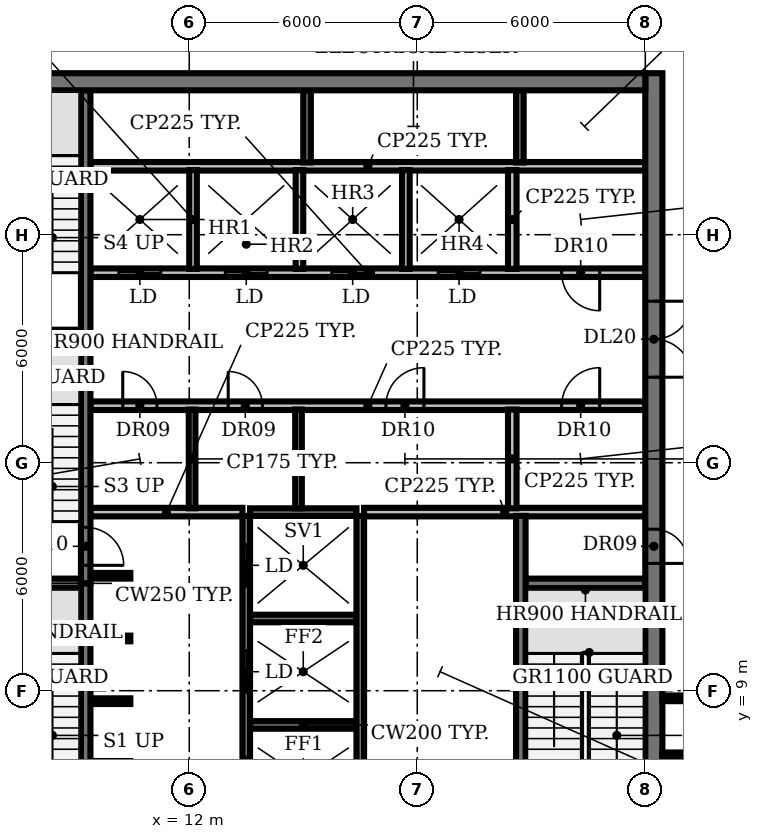
"""IFC4 building model, lengths in metres.
Left out: names, types, materials, properties, quantities, classifications, styles, units other than length and angle.
Written with IfcOpenShell. Run it as: python <this file> out.ifc"""

import sys

from ifc_helpers import new_model, si_unit, direction, frame, frame_2d, origin, place, context, subcontext, project, spatial, rectangle, extrude, element, fill, save


model = new_model("IFC4")
c1 = context("Model", 3, precision=1e-05, world=origin(), true_north=direction((0.0, 1.0)))
c2 = subcontext(c1, "Body", "Model", "MODEL_VIEW")
j1 = project(units=[si_unit("LENGTHUNIT", "METRE"), si_unit("PLANEANGLEUNIT", "RADIAN")], contexts=[c1])
p1 = place(None, origin())
s1 = spatial("IfcSite", under=j1, at=p1, CompositionType="ELEMENT")
p2 = place(p1, origin())
s2 = spatial("IfcBuilding", under=s1, at=p2, CompositionType="ELEMENT")
p3 = place(p2, frame((0.0, 0.0, 230.6)))
s3 = spatial("IfcBuildingStorey", under=s2, at=p3, CompositionType="ELEMENT", Elevation=230.6)
p4 = place(p3, frame((13.6, 8.1, 0.0), z_axis=(0.0, 0.0, 1.0), x_axis=(1.0, 0.0, 0.0)))
e1 = element("IfcWall", 1, at=p4, inside=s3, PredefinedType="SHEAR", context=c2, shape_type="SweptSolid", body=[
    extrude(rectangle(XDim=2.8, YDim=0.2, at=frame_2d((1.4, 0.0))), origin(), (0.0, 0.0, 1.0), 3.85),
])
for number, where, z_axis, x_axis in (
    (2, (9.4, 8.725, 0.0), (0.0, 0.0, 1.0), (1.0, 0.0, 0.0)),
    (3, (9.4, 10.375, 0.0), (0.0, 0.0, 1.0), (1.0, 0.0, 0.0)),
):
    element("IfcWall", number, at=place(p3, frame(where, z_axis=z_axis, x_axis=x_axis)), inside=s3, PredefinedType="SHEAR", context=c2, shape_type="SweptSolid", body=[
        extrude(rectangle(XDim=1.05, YDim=0.15, at=frame_2d((0.525, 0.0))), origin(), (0.0, 0.0, 1.0), 3.85),
    ])
p5 = place(p3, frame((13.6, 10.9, 0.0), z_axis=(0.0, 0.0, 1.0), x_axis=(1.0, 0.0, 0.0)))
e4 = element("IfcWall", 4, at=p5, inside=s3, PredefinedType="SHEAR", context=c2, shape_type="SweptSolid", body=[
    extrude(rectangle(XDim=2.8, YDim=0.2, at=frame_2d((1.4, 0.0))), origin(), (0.0, 0.0, 1.0), 3.85),
])
for number, where, z_axis, x_axis in (
    (5, (6.0, 11.825, 0.0), (0.0, 0.0, 1.0), (1.0, 0.0, 0.0)),
    (6, (20.85, 11.825, 0.0), (0.0, 0.0, 1.0), (1.0, 0.0, 0.0)),
):
    element("IfcWall", number, at=place(p3, frame(where, z_axis=z_axis, x_axis=x_axis)), inside=s3, PredefinedType="SHEAR", context=c2, shape_type="SweptSolid", body=[
        extrude(rectangle(XDim=3.15, YDim=0.25, at=frame_2d((1.575, 0.0))), origin(), (0.0, 0.0, 1.0), 3.85),
    ])
p6 = place(p3, frame((9.4, 12.025, 0.0), z_axis=(0.0, 0.0, 1.0), x_axis=(1.0, 0.0, 0.0)))
e7 = element("IfcWall", 7, at=p6, inside=s3, PredefinedType="SHEAR", context=c2, shape_type="SweptSolid", body=[
    extrude(rectangle(XDim=1.05, YDim=0.15, at=frame_2d((0.525, 0.0))), origin(), (0.0, 0.0, 1.0), 3.85),
])
p7 = place(p3, frame((9.4, 13.7, 0.0), z_axis=(0.0, 0.0, 1.0), x_axis=(1.0, 0.0, 0.0)))
e8 = element("IfcWall", 8, at=p7, inside=s3, PredefinedType="PARTITIONING", context=c2, shape_type="SweptSolid", body=[
    extrude(rectangle(XDim=4.0, YDim=0.225, at=frame_2d((2.0, 0.0))), origin(), (0.0, 0.0, 1.0), 3.85),
])
p8 = place(p3, frame((13.6, 13.7, 0.0), z_axis=(0.0, 0.0, 1.0), x_axis=(1.0, 0.0, 0.0)))
e9 = element("IfcWall", 9, at=p8, inside=s3, PredefinedType="SHEAR", context=c2, shape_type="SweptSolid", body=[
    extrude(rectangle(XDim=2.8, YDim=0.2, at=frame_2d((1.4, 0.0))), origin(), (0.0, 0.0, 1.0), 3.85),
])
p9 = place(p3, frame((16.6, 13.7, 0.0), z_axis=(0.0, 0.0, 1.0), x_axis=(1.0, 0.0, 0.0)))
e10 = element("IfcWall", 10, at=p9, inside=s3, PredefinedType="PARTITIONING", context=c2, shape_type="SweptSolid", body=[
    extrude(rectangle(XDim=7.4, YDim=0.225, at=frame_2d((3.7, 0.0))), origin(), (0.0, 0.0, 1.0), 3.85),
])
p10 = place(p3, frame((9.4, 16.5, 0.0), z_axis=(0.0, 0.0, 1.0), x_axis=(1.0, 0.0, 0.0)))
e11 = element("IfcWall", 11, at=p10, inside=s3, PredefinedType="PARTITIONING", context=c2, shape_type="SweptSolid", body=[
    extrude(rectangle(XDim=14.6, YDim=0.225, at=frame_2d((7.3, 0.0))), origin(), (0.0, 0.0, 1.0), 3.85),
])
p11 = place(p10, frame((0.85, 0.0, 0.0)))
e12 = element("IfcOpeningElement", 12, at=p11, cuts=e11, PredefinedType="OPENING", context=c2, shape_type="SweptSolid", body=[
    extrude(rectangle(XDim=0.9, YDim=2.1, at=frame_2d((0.45, 1.05))), frame((0.0, 0.123, 0.0), z_axis=(0.0, -1.0, 0.0), x_axis=(1.0, 0.0, 0.0)), (0.0, 0.0, 1.0), 0.245),
])
p12 = place(p10, frame((3.625, 0.0, 0.0)))
e13 = element("IfcOpeningElement", 13, at=p12, cuts=e11, PredefinedType="OPENING", context=c2, shape_type="SweptSolid", body=[
    extrude(rectangle(XDim=0.9, YDim=2.1, at=frame_2d((0.45, 1.05))), frame((0.0, 0.123, 0.0), z_axis=(0.0, -1.0, 0.0), x_axis=(1.0, 0.0, 0.0)), (0.0, 0.0, 1.0), 0.245),
])
p13 = place(p10, frame((7.775, 0.0, 0.0)))
e14 = element("IfcOpeningElement", 14, at=p13, cuts=e11, PredefinedType="OPENING", context=c2, shape_type="SweptSolid", body=[
    extrude(rectangle(XDim=1.0, YDim=2.1, at=frame_2d((0.5, 1.05))), frame((0.0, 0.123, 0.0), z_axis=(0.0, -1.0, 0.0), x_axis=(1.0, 0.0, 0.0)), (0.0, 0.0, 1.0), 0.245),
])
p14 = place(p10, frame((12.4, 0.0, 0.0)))
e15 = element("IfcOpeningElement", 15, at=p14, cuts=e11, PredefinedType="OPENING", context=c2, shape_type="SweptSolid", body=[
    extrude(rectangle(XDim=1.0, YDim=2.1, at=frame_2d((0.5, 1.05))), frame((0.0, 0.123, 0.0), z_axis=(0.0, -1.0, 0.0), x_axis=(1.0, 0.0, 0.0)), (0.0, 0.0, 1.0), 0.245),
])
p15 = place(p3, frame((6.0, 18.375, 0.0), z_axis=(0.0, 0.0, 1.0), x_axis=(1.0, 0.0, 0.0)))
e16 = element("IfcWall", 16, at=p15, inside=s3, PredefinedType="SHEAR", context=c2, shape_type="SweptSolid", body=[
    extrude(rectangle(XDim=3.15, YDim=0.25, at=frame_2d((1.575, 0.0))), origin(), (0.0, 0.0, 1.0), 3.85),
])
p16 = place(p3, frame((24.0, 20.0, 0.0), z_axis=(0.0, 0.0, 1.0), x_axis=(-1.0, 0.0, 0.0)))
e17 = element("IfcWall", 17, at=p16, inside=s3, PredefinedType="PARTITIONING", context=c2, shape_type="SweptSolid", body=[
    extrude(rectangle(XDim=14.6, YDim=0.225, at=frame_2d((7.3, 0.0))), origin(), (0.0, 0.0, 1.0), 3.85),
])
p17 = place(p16, frame((12.75, 0.0, 0.0)))
e18 = element("IfcOpeningElement", 18, at=p17, cuts=e17, PredefinedType="OPENING", context=c2, shape_type="SweptSolid", body=[
    extrude(rectangle(XDim=1.1, YDim=2.1, at=frame_2d((0.55, 1.05))), frame((0.0, 0.123, 0.0), z_axis=(0.0, -1.0, 0.0), x_axis=(1.0, 0.0, 0.0)), (0.0, 0.0, 1.0), 0.245),
])
p18 = place(p16, frame((9.95, 0.0, 0.0)))
e19 = element("IfcOpeningElement", 19, at=p18, cuts=e17, PredefinedType="OPENING", context=c2, shape_type="SweptSolid", body=[
    extrude(rectangle(XDim=1.1, YDim=2.1, at=frame_2d((0.55, 1.05))), frame((0.0, 0.123, 0.0), z_axis=(0.0, -1.0, 0.0), x_axis=(1.0, 0.0, 0.0)), (0.0, 0.0, 1.0), 0.245),
])
p19 = place(p16, frame((7.15, 0.0, 0.0)))
e20 = element("IfcOpeningElement", 20, at=p19, cuts=e17, PredefinedType="OPENING", context=c2, shape_type="SweptSolid", body=[
    extrude(rectangle(XDim=1.1, YDim=2.1, at=frame_2d((0.55, 1.05))), frame((0.0, 0.123, 0.0), z_axis=(0.0, -1.0, 0.0), x_axis=(1.0, 0.0, 0.0)), (0.0, 0.0, 1.0), 0.245),
])
p20 = place(p16, frame((4.35, 0.0, 0.0)))
e21 = element("IfcOpeningElement", 21, at=p20, cuts=e17, PredefinedType="OPENING", context=c2, shape_type="SweptSolid", body=[
    extrude(rectangle(XDim=1.1, YDim=2.1, at=frame_2d((0.55, 1.05))), frame((0.0, 0.123, 0.0), z_axis=(0.0, -1.0, 0.0), x_axis=(1.0, 0.0, 0.0)), (0.0, 0.0, 1.0), 0.245),
])
p21 = place(p16, frame((1.2, 0.0, 0.0)))
e22 = element("IfcOpeningElement", 22, at=p21, cuts=e17, PredefinedType="OPENING", context=c2, shape_type="SweptSolid", body=[
    extrude(rectangle(XDim=1.0, YDim=2.1, at=frame_2d((0.5, 1.05))), frame((0.0, 0.123, 0.0), z_axis=(0.0, -1.0, 0.0), x_axis=(1.0, 0.0, 0.0)), (0.0, 0.0, 1.0), 0.245),
])
p22 = place(p3, frame((9.4, 22.8, 0.0), z_axis=(0.0, 0.0, 1.0), x_axis=(1.0, 0.0, 0.0)))
e23 = element("IfcWall", 23, at=p22, inside=s3, PredefinedType="PARTITIONING", context=c2, shape_type="SweptSolid", body=[
    extrude(rectangle(XDim=14.6, YDim=0.225, at=frame_2d((7.3, 0.0))), origin(), (0.0, 0.0, 1.0), 3.85),
])
p23 = place(p3, frame((9.275, 11.825, 0.0), z_axis=(0.0, 0.0, 1.0), x_axis=(0.0, -1.0, 0.0)))
e24 = element("IfcWall", 24, at=p23, inside=s3, PredefinedType="SHEAR", context=c2, shape_type="SweptSolid", body=[
    extrude(rectangle(XDim=6.425, YDim=0.25, at=frame_2d((3.212, 0.0))), origin(), (0.0, 0.0, 1.0), 3.85),
])
p24 = place(p23, frame((5.075, 0.0, 0.0)))
e25 = element("IfcOpeningElement", 25, at=p24, cuts=e24, PredefinedType="OPENING", context=c2, shape_type="SweptSolid", body=[
    extrude(rectangle(XDim=1.0, YDim=2.1, at=frame_2d((0.5, 1.05))), frame((0.0, 0.135, 0.0), z_axis=(0.0, -1.0, 0.0), x_axis=(1.0, 0.0, 0.0)), (0.0, 0.0, 1.0), 0.27),
])
p25 = place(p3, frame((9.275, 18.375, 0.0), z_axis=(0.0, 0.0, 1.0), x_axis=(0.0, -1.0, 0.0)))
e26 = element("IfcWall", 26, at=p25, inside=s3, PredefinedType="SHEAR", context=c2, shape_type="SweptSolid", body=[
    extrude(rectangle(XDim=6.55, YDim=0.25, at=frame_2d((3.275, 0.0))), origin(), (0.0, 0.0, 1.0), 3.85),
])
p26 = place(p25, frame((5.075, 0.0, 0.0)))
e27 = element("IfcOpeningElement", 27, at=p26, cuts=e26, PredefinedType="OPENING", context=c2, shape_type="SweptSolid", body=[
    extrude(rectangle(XDim=1.0, YDim=2.1, at=frame_2d((0.5, 1.05))), frame((0.0, 0.135, 0.0), z_axis=(0.0, -1.0, 0.0), x_axis=(1.0, 0.0, 0.0)), (0.0, 0.0, 1.0), 0.27),
])
p27 = place(p3, frame((9.275, 18.375, 0.0), z_axis=(0.0, 0.0, 1.0), x_axis=(0.0, 1.0, 0.0)))
e28 = element("IfcWall", 28, at=p27, inside=s3, PredefinedType="SHEAR", context=c2, shape_type="SweptSolid", body=[
    extrude(rectangle(XDim=6.425, YDim=0.25, at=frame_2d((3.212, 0.0))), origin(), (0.0, 0.0, 1.0), 3.85),
])
p28 = place(p3, frame((12.075, 13.8, 0.0), z_axis=(0.0, 0.0, 1.0), x_axis=(0.0, 1.0, 0.0)))
e29 = element("IfcWall", 29, at=p28, inside=s3, PredefinedType="PARTITIONING", context=c2, shape_type="SweptSolid", body=[
    extrude(rectangle(XDim=2.6, YDim=0.175, at=frame_2d((1.3, 0.0))), origin(), (0.0, 0.0, 1.0), 3.85),
])
p29 = place(p3, frame((12.1, 20.1, 0.0), z_axis=(0.0, 0.0, 1.0), x_axis=(0.0, 1.0, 0.0)))
e30 = element("IfcWall", 30, at=p29, inside=s3, PredefinedType="SOLIDWALL", context=c2, shape_type="SweptSolid", body=[
    extrude(rectangle(XDim=2.6, YDim=0.2, at=frame_2d((1.3, 0.0))), origin(), (0.0, 0.0, 1.0), 3.85),
])
p30 = place(p3, frame((13.5, 5.4, 0.0), z_axis=(0.0, 0.0, 1.0), x_axis=(0.0, 1.0, 0.0)))
e31 = element("IfcWall", 31, at=p30, inside=s3, PredefinedType="SHEAR", context=c2, shape_type="SweptSolid", body=[
    extrude(rectangle(XDim=8.2, YDim=0.2, at=frame_2d((4.1, 0.0))), origin(), (0.0, 0.0, 1.0), 3.85),
])
p31 = place(p30, frame((0.75, 0.0, 0.0)))
e32 = element("IfcOpeningElement", 32, at=p31, cuts=e31, PredefinedType="OPENING", context=c2, shape_type="SweptSolid", body=[
    extrude(rectangle(XDim=1.1, YDim=2.1, at=frame_2d((0.55, 1.05))), frame((0.0, 0.11, 0.0), z_axis=(0.0, -1.0, 0.0), x_axis=(1.0, 0.0, 0.0)), (0.0, 0.0, 1.0), 0.22),
])
p32 = place(p30, frame((3.55, 0.0, 0.0)))
e33 = element("IfcOpeningElement", 33, at=p32, cuts=e31, PredefinedType="OPENING", context=c2, shape_type="SweptSolid", body=[
    extrude(rectangle(XDim=1.1, YDim=2.1, at=frame_2d((0.55, 1.05))), frame((0.0, 0.11, 0.0), z_axis=(0.0, -1.0, 0.0), x_axis=(1.0, 0.0, 0.0)), (0.0, 0.0, 1.0), 0.22),
])
p33 = place(p30, frame((6.35, 0.0, 0.0)))
e34 = element("IfcOpeningElement", 34, at=p33, cuts=e31, PredefinedType="OPENING", context=c2, shape_type="SweptSolid", body=[
    extrude(rectangle(XDim=1.1, YDim=2.1, at=frame_2d((0.55, 1.05))), frame((0.0, 0.11, 0.0), z_axis=(0.0, -1.0, 0.0), x_axis=(1.0, 0.0, 0.0)), (0.0, 0.0, 1.0), 0.22),
])
p34 = place(p3, frame((14.875, 13.8, 0.0), z_axis=(0.0, 0.0, 1.0), x_axis=(0.0, 1.0, 0.0)))
e35 = element("IfcWall", 35, at=p34, inside=s3, PredefinedType="PARTITIONING", context=c2, shape_type="SweptSolid", body=[
    extrude(rectangle(XDim=2.6, YDim=0.175, at=frame_2d((1.3, 0.0))), origin(), (0.0, 0.0, 1.0), 3.85),
])
p35 = place(p3, frame((14.9, 20.1, 0.0), z_axis=(0.0, 0.0, 1.0), x_axis=(0.0, 1.0, 0.0)))
e36 = element("IfcWall", 36, at=p35, inside=s3, PredefinedType="SOLIDWALL", context=c2, shape_type="SweptSolid", body=[
    extrude(rectangle(XDim=2.6, YDim=0.2, at=frame_2d((1.3, 0.0))), origin(), (0.0, 0.0, 1.0), 3.85),
])
p36 = place(p3, frame((15.1, 22.9, 0.0), z_axis=(0.0, 0.0, 1.0), x_axis=(0.0, 1.0, 0.0)))
e37 = element("IfcWall", 37, at=p36, inside=s3, PredefinedType="SHEAR", context=c2, shape_type="SweptSolid", body=[
    extrude(rectangle(XDim=1.9, YDim=0.2, at=frame_2d((0.95, 0.0))), origin(), (0.0, 0.0, 1.0), 3.85),
])
p37 = place(p3, frame((16.5, 5.4, 0.0), z_axis=(0.0, 0.0, 1.0), x_axis=(0.0, 1.0, 0.0)))
e38 = element("IfcWall", 38, at=p37, inside=s3, PredefinedType="SHEAR", context=c2, shape_type="SweptSolid", body=[
    extrude(rectangle(XDim=8.2, YDim=0.2, at=frame_2d((4.1, 0.0))), origin(), (0.0, 0.0, 1.0), 3.85),
])
p38 = place(p3, frame((17.7, 20.1, 0.0), z_axis=(0.0, 0.0, 1.0), x_axis=(0.0, 1.0, 0.0)))
e39 = element("IfcWall", 39, at=p38, inside=s3, PredefinedType="SOLIDWALL", context=c2, shape_type="SweptSolid", body=[
    extrude(rectangle(XDim=2.6, YDim=0.2, at=frame_2d((1.3, 0.0))), origin(), (0.0, 0.0, 1.0), 3.85),
])
for number, where, z_axis, x_axis in (
    (40, (20.5, 13.8, 0.0), (0.0, 0.0, 1.0), (0.0, 1.0, 0.0)),
    (41, (20.5, 20.1, 0.0), (0.0, 0.0, 1.0), (0.0, 1.0, 0.0)),
):
    element("IfcWall", number, at=place(p3, frame(where, z_axis=z_axis, x_axis=x_axis)), inside=s3, PredefinedType="PARTITIONING", context=c2, shape_type="SweptSolid", body=[
        extrude(rectangle(XDim=2.6, YDim=0.225, at=frame_2d((1.3, 0.0))), origin(), (0.0, 0.0, 1.0), 3.85),
    ])
p39 = place(p3, frame((20.7, 22.9, 0.0), z_axis=(0.0, 0.0, 1.0), x_axis=(0.0, 1.0, 0.0)))
e42 = element("IfcWall", 42, at=p39, inside=s3, PredefinedType="SHEAR", context=c2, shape_type="SweptSolid", body=[
    extrude(rectangle(XDim=1.9, YDim=0.2, at=frame_2d((0.95, 0.0))), origin(), (0.0, 0.0, 1.0), 3.85),
])
p40 = place(p3, frame((20.725, 5.4, 0.0), z_axis=(0.0, 0.0, 1.0), x_axis=(0.0, 1.0, 0.0)))
e43 = element("IfcWall", 43, at=p40, inside=s3, PredefinedType="SHEAR", context=c2, shape_type="SweptSolid", body=[
    extrude(rectangle(XDim=8.2, YDim=0.25, at=frame_2d((4.1, 0.0))), origin(), (0.0, 0.0, 1.0), 3.85),
])
p41 = place(p3, frame((24.225, 25.25, 0.0), z_axis=(0.0, 0.0, 1.0), x_axis=(0.0, -1.0, 0.0)))
e44 = element("IfcWall", 44, at=p41, inside=s3, PredefinedType="SHEAR", context=c2, shape_type="SweptSolid", body=[
    extrude(rectangle(XDim=20.83, YDim=0.45, at=frame_2d((10.415, 0.0))), origin(), (0.0, 0.0, 1.0), 3.85),
])
p42 = place(p41, frame((18.1, 0.0, 0.0)))
e45 = element("IfcOpeningElement", 45, at=p42, cuts=e44, PredefinedType="OPENING", context=c2, shape_type="SweptSolid", body=[
    extrude(rectangle(XDim=1.5, YDim=2.1, at=frame_2d((0.75, 1.05))), frame((0.0, 0.235, 0.0), z_axis=(0.0, -1.0, 0.0), x_axis=(1.0, 0.0, 0.0)), (0.0, 0.0, 1.0), 0.47),
])
p43 = place(p41, frame((12.0, 0.0, 0.0)))
e46 = element("IfcOpeningElement", 46, at=p43, cuts=e44, PredefinedType="OPENING", context=c2, shape_type="SweptSolid", body=[
    extrude(rectangle(XDim=0.9, YDim=2.1, at=frame_2d((0.45, 1.05))), frame((0.0, 0.235, 0.0), z_axis=(0.0, -1.0, 0.0), x_axis=(1.0, 0.0, 0.0)), (0.0, 0.0, 1.0), 0.47),
])
p44 = place(p41, frame((6.0, 0.0, 0.0)))
e47 = element("IfcOpeningElement", 47, at=p44, cuts=e44, PredefinedType="OPENING", context=c2, shape_type="SweptSolid", body=[
    extrude(rectangle(XDim=2.0, YDim=2.1, at=frame_2d((1.0, 1.05))), frame((0.0, 0.235, 0.0), z_axis=(0.0, -1.0, 0.0), x_axis=(1.0, 0.0, 0.0)), (0.0, 0.0, 1.0), 0.47),
])
p45 = place(p3, frame((6.0, 25.025, 0.0), z_axis=(0.0, 0.0, 1.0), x_axis=(1.0, 0.0, 0.0)))
e48 = element("IfcWall", 48, at=p45, inside=s3, PredefinedType="SHEAR", context=c2, shape_type="SweptSolid", body=[
    extrude(rectangle(XDim=18.0, YDim=0.45, at=frame_2d((9.0, 0.0))), origin(), (0.0, 0.0, 1.0), 3.85),
])
for number, where, z_axis, x_axis in (
    (49, (24.45, 7.3, 0.0), (0.0, 0.0, 1.0), (1.0, 0.0, 0.0)),
    (50, (24.45, 8.8, 0.0), (0.0, 0.0, 1.0), (1.0, 0.0, 0.0)),
):
    element("IfcWall", number, at=place(p3, frame(where, z_axis=z_axis, x_axis=x_axis)), inside=s3, PredefinedType="PARTITIONING", context=c2, shape_type="SweptSolid", body=[
        extrude(rectangle(XDim=1.05, YDim=0.15, at=frame_2d((0.525, 0.0))), origin(), (0.0, 0.0, 1.0), 2.88),
    ])
p46 = place(p11, origin())
e51 = element("IfcDoor", 51, at=p46, inside=s3, OperationType="SINGLE_SWING_LEFT", PredefinedType="DOOR", context=c2, shape_type="SweptSolid", body=[
    extrude(rectangle(XDim=0.9, YDim=2.1, at=frame_2d((0.45, 1.05))), frame((0.0, 0.025, 0.0), z_axis=(0.0, -1.0, 0.0), x_axis=(1.0, 0.0, 0.0)), (0.0, 0.0, 1.0), 0.05),
])
fill(e12, e51)
p47 = place(p12, origin())
e52 = element("IfcDoor", 52, at=p47, inside=s3, OperationType="SINGLE_SWING_LEFT", PredefinedType="DOOR", context=c2, shape_type="SweptSolid", body=[
    extrude(rectangle(XDim=0.9, YDim=2.1, at=frame_2d((0.45, 1.05))), frame((0.0, 0.025, 0.0), z_axis=(0.0, -1.0, 0.0), x_axis=(1.0, 0.0, 0.0)), (0.0, 0.0, 1.0), 0.05),
])
fill(e13, e52)
p48 = place(p13, origin())
e53 = element("IfcDoor", 53, at=p48, inside=s3, OperationType="SINGLE_SWING_RIGHT", PredefinedType="DOOR", context=c2, shape_type="SweptSolid", body=[
    extrude(rectangle(XDim=1.0, YDim=2.1, at=frame_2d((0.5, 1.05))), frame((0.0, 0.025, 0.0), z_axis=(0.0, -1.0, 0.0), x_axis=(1.0, 0.0, 0.0)), (0.0, 0.0, 1.0), 0.05),
])
fill(e14, e53)
p49 = place(p14, origin())
e54 = element("IfcDoor", 54, at=p49, inside=s3, OperationType="SINGLE_SWING_RIGHT", PredefinedType="DOOR", context=c2, shape_type="SweptSolid", body=[
    extrude(rectangle(XDim=1.0, YDim=2.1, at=frame_2d((0.5, 1.05))), frame((0.0, 0.025, 0.0), z_axis=(0.0, -1.0, 0.0), x_axis=(1.0, 0.0, 0.0)), (0.0, 0.0, 1.0), 0.05),
])
fill(e15, e54)
p50 = place(p17, origin())
e55 = element("IfcDoor", 55, at=p50, inside=s3, OperationType="DOUBLE_DOOR_SLIDING", PredefinedType="DOOR", context=c2, shape_type="SweptSolid", body=[
    extrude(rectangle(XDim=1.1, YDim=2.1, at=frame_2d((0.55, 1.05))), frame((0.0, 0.025, 0.0), z_axis=(0.0, -1.0, 0.0), x_axis=(1.0, 0.0, 0.0)), (0.0, 0.0, 1.0), 0.05),
])
fill(e18, e55)
p51 = place(p18, origin())
e56 = element("IfcDoor", 56, at=p51, inside=s3, OperationType="DOUBLE_DOOR_SLIDING", PredefinedType="DOOR", context=c2, shape_type="SweptSolid", body=[
    extrude(rectangle(XDim=1.1, YDim=2.1, at=frame_2d((0.55, 1.05))), frame((0.0, 0.025, 0.0), z_axis=(0.0, -1.0, 0.0), x_axis=(1.0, 0.0, 0.0)), (0.0, 0.0, 1.0), 0.05),
])
fill(e19, e56)
p52 = place(p19, origin())
e57 = element("IfcDoor", 57, at=p52, inside=s3, OperationType="DOUBLE_DOOR_SLIDING", PredefinedType="DOOR", context=c2, shape_type="SweptSolid", body=[
    extrude(rectangle(XDim=1.1, YDim=2.1, at=frame_2d((0.55, 1.05))), frame((0.0, 0.025, 0.0), z_axis=(0.0, -1.0, 0.0), x_axis=(1.0, 0.0, 0.0)), (0.0, 0.0, 1.0), 0.05),
])
fill(e20, e57)
p53 = place(p20, origin())
e58 = element("IfcDoor", 58, at=p53, inside=s3, OperationType="DOUBLE_DOOR_SLIDING", PredefinedType="DOOR", context=c2, shape_type="SweptSolid", body=[
    extrude(rectangle(XDim=1.1, YDim=2.1, at=frame_2d((0.55, 1.05))), frame((0.0, 0.025, 0.0), z_axis=(0.0, -1.0, 0.0), x_axis=(1.0, 0.0, 0.0)), (0.0, 0.0, 1.0), 0.05),
])
fill(e21, e58)
p54 = place(p21, origin())
e59 = element("IfcDoor", 59, at=p54, inside=s3, OperationType="SINGLE_SWING_LEFT", PredefinedType="DOOR", context=c2, shape_type="SweptSolid", body=[
    extrude(rectangle(XDim=1.0, YDim=2.1, at=frame_2d((0.5, 1.05))), frame((0.0, 0.025, 0.0), z_axis=(0.0, -1.0, 0.0), x_axis=(1.0, 0.0, 0.0)), (0.0, 0.0, 1.0), 0.05),
])
fill(e22, e59)
p55 = place(p26, origin())
e60 = element("IfcDoor", 60, at=p55, inside=s3, OperationType="SINGLE_SWING_RIGHT", PredefinedType="DOOR", context=c2, shape_type="SweptSolid", body=[
    extrude(rectangle(XDim=1.0, YDim=2.1, at=frame_2d((0.5, 1.05))), frame((0.0, 0.025, 0.0), z_axis=(0.0, -1.0, 0.0), x_axis=(1.0, 0.0, 0.0)), (0.0, 0.0, 1.0), 0.05),
])
fill(e27, e60)
p56 = place(p31, origin())
e61 = element("IfcDoor", 61, at=p56, inside=s3, OperationType="DOUBLE_DOOR_SLIDING", PredefinedType="DOOR", context=c2, shape_type="SweptSolid", body=[
    extrude(rectangle(XDim=1.1, YDim=2.1, at=frame_2d((0.55, 1.05))), frame((0.0, 0.025, 0.0), z_axis=(0.0, -1.0, 0.0), x_axis=(1.0, 0.0, 0.0)), (0.0, 0.0, 1.0), 0.05),
])
fill(e32, e61)
p57 = place(p32, origin())
e62 = element("IfcDoor", 62, at=p57, inside=s3, OperationType="DOUBLE_DOOR_SLIDING", PredefinedType="DOOR", context=c2, shape_type="SweptSolid", body=[
    extrude(rectangle(XDim=1.1, YDim=2.1, at=frame_2d((0.55, 1.05))), frame((0.0, 0.025, 0.0), z_axis=(0.0, -1.0, 0.0), x_axis=(1.0, 0.0, 0.0)), (0.0, 0.0, 1.0), 0.05),
])
fill(e33, e62)
p58 = place(p33, origin())
e63 = element("IfcDoor", 63, at=p58, inside=s3, OperationType="DOUBLE_DOOR_SLIDING", PredefinedType="DOOR", context=c2, shape_type="SweptSolid", body=[
    extrude(rectangle(XDim=1.1, YDim=2.1, at=frame_2d((0.55, 1.05))), frame((0.0, 0.025, 0.0), z_axis=(0.0, -1.0, 0.0), x_axis=(1.0, 0.0, 0.0)), (0.0, 0.0, 1.0), 0.05),
])
fill(e34, e63)
p59 = place(p43, origin())
e64 = element("IfcDoor", 64, at=p59, inside=s3, OperationType="SINGLE_SWING_RIGHT", PredefinedType="DOOR", context=c2, shape_type="SweptSolid", body=[
    extrude(rectangle(XDim=0.9, YDim=2.1, at=frame_2d((0.45, 1.05))), frame((0.0, 0.025, 0.0), z_axis=(0.0, -1.0, 0.0), x_axis=(1.0, 0.0, 0.0)), (0.0, 0.0, 1.0), 0.05),
])
fill(e46, e64)
p60 = place(p44, origin())
e65 = element("IfcDoor", 65, at=p60, inside=s3, OperationType="DOUBLE_DOOR_SINGLE_SWING", PredefinedType="DOOR", context=c2, shape_type="SweptSolid", body=[
    extrude(rectangle(XDim=2.0, YDim=2.1, at=frame_2d((1.0, 1.05))), frame((0.0, 0.025, 0.0), z_axis=(0.0, -1.0, 0.0), x_axis=(1.0, 0.0, 0.0)), (0.0, 0.0, 1.0), 0.05),
])
fill(e47, e65)
save(model, sys.argv[1])
